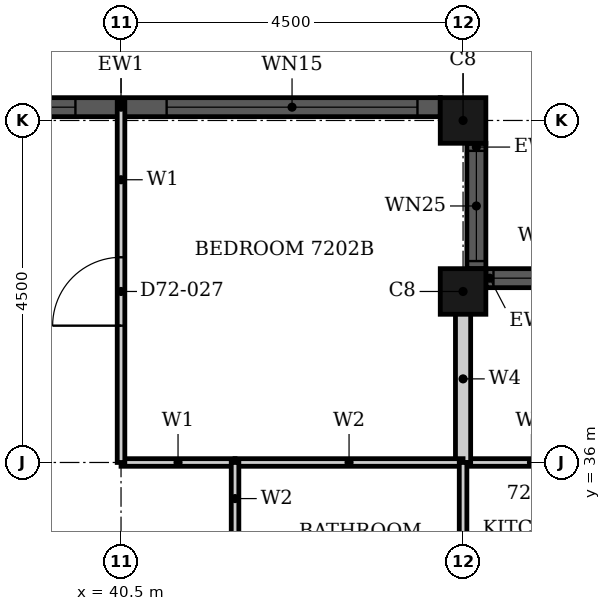
"""IFC4 building model, lengths in metres.
Left out: names, types, materials, properties, quantities, classifications, styles, units other than length and angle.
Written with IfcOpenShell. Run it as: python <this file> out.ifc"""

import sys

from ifc_helpers import new_model, si_unit, direction, frame, frame_2d, origin, origin_2d, place, context, subcontext, project, spatial, rectangle, hollow_rectangle, extrude, element, fill, save


model = new_model("IFC4")
c1 = context("Model", 3, precision=1e-05, world=origin(), true_north=direction((0.0, 1.0)))
c2 = subcontext(c1, "Body", "Model", "MODEL_VIEW")
j1 = project(units=[si_unit("LENGTHUNIT", "METRE"), si_unit("PLANEANGLEUNIT", "RADIAN")], contexts=[c1])
p1 = place(None, origin())
s1 = spatial("IfcSite", under=j1, at=p1, CompositionType="ELEMENT")
p2 = place(p1, origin())
s2 = spatial("IfcBuilding", under=s1, at=p2, CompositionType="ELEMENT")
p3 = place(p2, frame((0.0, 0.0, 283.4)))
s3 = spatial("IfcBuildingStorey", under=s2, at=p3, CompositionType="ELEMENT", Elevation=283.4)
for number, where, z_axis, x_axis in (
    (1, (45.0, 38.25, 0.0), (0.0, 0.0, 1.0), (1.0, 0.0, 0.0)),
    (2, (45.0, 40.5, 0.0), (0.0, 0.0, 1.0), (1.0, 0.0, 0.0)),
):
    element("IfcColumn", number, at=place(p3, frame(where, z_axis=z_axis, x_axis=x_axis)), inside=s3, PredefinedType="COLUMN", context=c2, shape_type="SweptSolid", body=[
        extrude(hollow_rectangle(XDim=0.6, YDim=0.6, WallThickness=0.02, at=origin_2d()), origin(), (0.0, 0.0, 1.0), 3.7),
    ])
p4 = place(p3, frame((46.95, 38.425, 0.0), z_axis=(0.0, 0.0, 1.0), x_axis=(-1.0, 0.0, 0.0)))
e3 = element("IfcWall", 3, at=p4, inside=s3, PredefinedType="SOLIDWALL", context=c2, shape_type="SweptSolid", body=[
    extrude(rectangle(XDim=1.65, YDim=0.25, at=frame_2d((0.825, 0.0))), origin(), (0.0, 0.0, 1.0), 3.7),
])
p5 = place(p4, frame((0.1, 0.0, 0.9)))
e4 = element("IfcOpeningElement", 4, at=p5, cuts=e3, PredefinedType="OPENING", context=c2, shape_type="SweptSolid", body=[
    extrude(rectangle(XDim=1.45, YDim=1.85, at=frame_2d((0.725, 0.925))), frame((0.0, 0.135, 0.0), z_axis=(0.0, -1.0, 0.0), x_axis=(1.0, 0.0, 0.0)), (0.0, 0.0, 1.0), 0.27),
])
p6 = place(p3, frame((45.175, 38.55, 0.0), z_axis=(0.0, 0.0, 1.0), x_axis=(0.0, 1.0, 0.0)))
e5 = element("IfcWall", 5, at=p6, inside=s3, PredefinedType="SOLIDWALL", context=c2, shape_type="SweptSolid", body=[
    extrude(rectangle(XDim=1.65, YDim=0.25, at=frame_2d((0.825, 0.0))), origin(), (0.0, 0.0, 1.0), 3.7),
])
p7 = place(p6, frame((0.1, 0.0, 0.9)))
e6 = element("IfcOpeningElement", 6, at=p7, cuts=e5, PredefinedType="OPENING", context=c2, shape_type="SweptSolid", body=[
    extrude(rectangle(XDim=1.45, YDim=1.85, at=frame_2d((0.725, 0.925))), frame((0.0, 0.135, 0.0), z_axis=(0.0, -1.0, 0.0), x_axis=(1.0, 0.0, 0.0)), (0.0, 0.0, 1.0), 0.27),
])
p8 = place(p3, frame((44.7, 40.675, 0.0), z_axis=(0.0, 0.0, 1.0), x_axis=(-1.0, 0.0, 0.0)))
e7 = element("IfcWall", 7, at=p8, inside=s3, PredefinedType="SOLIDWALL", context=c2, shape_type="SweptSolid", body=[
    extrude(rectangle(XDim=8.4, YDim=0.25, at=frame_2d((4.2, 0.0))), origin(), (0.0, 0.0, 1.0), 3.7),
])
p9 = place(p8, frame((0.3, 0.0, 0.45)))
e8 = element("IfcOpeningElement", 8, at=p9, cuts=e7, PredefinedType="OPENING", context=c2, shape_type="SweptSolid", body=[
    extrude(rectangle(XDim=3.3, YDim=2.3, at=frame_2d((1.65, 1.15))), frame((0.0, 0.135, 0.0), z_axis=(0.0, -1.0, 0.0), x_axis=(1.0, 0.0, 0.0)), (0.0, 0.0, 1.0), 0.27),
])
p10 = place(p8, frame((4.8, 0.0, 0.45)))
e9 = element("IfcOpeningElement", 9, at=p10, cuts=e7, PredefinedType="OPENING", context=c2, shape_type="SweptSolid", body=[
    extrude(rectangle(XDim=3.3, YDim=2.3, at=frame_2d((1.65, 1.15))), frame((0.0, 0.135, 0.0), z_axis=(0.0, -1.0, 0.0), x_axis=(1.0, 0.0, 0.0)), (0.0, 0.0, 1.0), 0.27),
])
p11 = place(p3, frame((40.5, 36.0, 0.0), z_axis=(0.0, 0.0, 1.0), x_axis=(1.0, 0.0, 0.0)))
e10 = element("IfcWall", 10, at=p11, inside=s3, PredefinedType="PARTITIONING", context=c2, shape_type="SweptSolid", body=[
    extrude(rectangle(XDim=1.5, YDim=0.1, at=frame_2d((0.75, 0.0))), origin(), (0.0, 0.0, 1.0), 3.4),
])
p12 = place(p3, frame((45.0, 36.0, 0.0), z_axis=(0.0, 0.0, 1.0), x_axis=(1.0, 0.0, 0.0)))
e11 = element("IfcWall", 11, at=p12, inside=s3, PredefinedType="PARTITIONING", context=c2, shape_type="SweptSolid", body=[
    extrude(rectangle(XDim=1.8, YDim=0.1, at=frame_2d((0.9, 0.0))), origin(), (0.0, 0.0, 1.0), 3.4),
])
p13 = place(p3, frame((40.5, 36.0, 0.0), z_axis=(0.0, 0.0, 1.0), x_axis=(0.0, 1.0, 0.0)))
e12 = element("IfcWall", 12, at=p13, inside=s3, PredefinedType="PARTITIONING", context=c2, shape_type="SweptSolid", body=[
    extrude(rectangle(XDim=4.74, YDim=0.1, at=frame_2d((2.37, 0.0))), origin(), (0.0, 0.0, 1.0), 3.4),
])
p14 = place(p13, frame((1.8, 0.0, 0.0)))
e13 = element("IfcOpeningElement", 13, at=p14, cuts=e12, PredefinedType="OPENING", context=c2, shape_type="SweptSolid", body=[
    extrude(rectangle(XDim=0.9, YDim=2.1, at=frame_2d((0.45, 1.05))), frame((0.0, 0.06, 0.0), z_axis=(0.0, -1.0, 0.0), x_axis=(1.0, 0.0, 0.0)), (0.0, 0.0, 1.0), 0.12),
])
p15 = place(p3, frame((45.0, 36.0, 0.0), z_axis=(0.0, 0.0, 1.0), x_axis=(0.0, 1.0, 0.0)))
e14 = element("IfcWall", 14, at=p15, inside=s3, PredefinedType="PARTITIONING", context=c2, shape_type="SweptSolid", body=[
    extrude(rectangle(XDim=2.2, YDim=0.2, at=frame_2d((1.1, 0.0))), origin(), (0.0, 0.0, 1.0), 3.4),
])
p16 = place(p3, frame((42.0, 36.0, 0.0), z_axis=(0.0, 0.0, 1.0), x_axis=(1.0, 0.0, 0.0)))
e15 = element("IfcWall", 15, at=p16, inside=s3, PredefinedType="PARTITIONING", context=c2, shape_type="SweptSolid", body=[
    extrude(rectangle(XDim=3.0, YDim=0.1, at=frame_2d((1.5, 0.0))), origin(), (0.0, 0.0, 1.0), 3.4),
])
p17 = place(p3, frame((42.0, 33.3, 0.0), z_axis=(0.0, 0.0, 1.0), x_axis=(0.0, 1.0, 0.0)))
e16 = element("IfcWall", 16, at=p17, inside=s3, PredefinedType="PARTITIONING", context=c2, shape_type="SweptSolid", body=[
    extrude(rectangle(XDim=2.7, YDim=0.1, at=frame_2d((1.35, 0.0))), origin(), (0.0, 0.0, 1.0), 3.4),
])
p18 = place(p17, frame((0.95, 0.0, 0.0)))
e17 = element("IfcOpeningElement", 17, at=p18, cuts=e16, PredefinedType="OPENING", context=c2, shape_type="SweptSolid", body=[
    extrude(rectangle(XDim=0.8, YDim=2.1, at=frame_2d((0.4, 1.05))), frame((0.0, 0.06, 0.0), z_axis=(0.0, -1.0, 0.0), x_axis=(1.0, 0.0, 0.0)), (0.0, 0.0, 1.0), 0.12),
])
p19 = place(p3, frame((45.0, 33.3, 0.0), z_axis=(0.0, 0.0, 1.0), x_axis=(0.0, 1.0, 0.0)))
e18 = element("IfcWall", 18, at=p19, inside=s3, PredefinedType="PARTITIONING", context=c2, shape_type="SweptSolid", body=[
    extrude(rectangle(XDim=2.7, YDim=0.1, at=frame_2d((1.35, 0.0))), origin(), (0.0, 0.0, 1.0), 3.4),
])
p20 = place(p5, origin())
e19 = element("IfcWindow", 19, at=p20, inside=s3, PartitioningType="SINGLE_PANEL", PredefinedType="WINDOW", context=c2, shape_type="SweptSolid", body=[
    extrude(rectangle(XDim=1.45, YDim=1.85, at=frame_2d((0.725, 0.925))), frame((0.0, 0.03, 0.0), z_axis=(0.0, -1.0, 0.0), x_axis=(1.0, 0.0, 0.0)), (0.0, 0.0, 1.0), 0.06),
])
fill(e4, e19)
p21 = place(p7, origin())
e20 = element("IfcWindow", 20, at=p21, inside=s3, PartitioningType="SINGLE_PANEL", PredefinedType="WINDOW", context=c2, shape_type="SweptSolid", body=[
    extrude(rectangle(XDim=1.45, YDim=1.85, at=frame_2d((0.725, 0.925))), frame((0.0, 0.03, 0.0), z_axis=(0.0, -1.0, 0.0), x_axis=(1.0, 0.0, 0.0)), (0.0, 0.0, 1.0), 0.06),
])
fill(e6, e20)
p22 = place(p9, origin())
e21 = element("IfcWindow", 21, at=p22, inside=s3, PartitioningType="SINGLE_PANEL", PredefinedType="WINDOW", context=c2, shape_type="SweptSolid", body=[
    extrude(rectangle(XDim=3.3, YDim=2.3, at=frame_2d((1.65, 1.15))), frame((0.0, 0.03, 0.0), z_axis=(0.0, -1.0, 0.0), x_axis=(1.0, 0.0, 0.0)), (0.0, 0.0, 1.0), 0.06),
])
fill(e8, e21)
p23 = place(p10, origin())
e22 = element("IfcWindow", 22, at=p23, inside=s3, PartitioningType="SINGLE_PANEL", PredefinedType="WINDOW", context=c2, shape_type="SweptSolid", body=[
    extrude(rectangle(XDim=3.3, YDim=2.3, at=frame_2d((1.65, 1.15))), frame((0.0, 0.03, 0.0), z_axis=(0.0, -1.0, 0.0), x_axis=(1.0, 0.0, 0.0)), (0.0, 0.0, 1.0), 0.06),
])
fill(e9, e22)
p24 = place(p14, origin())
e23 = element("IfcDoor", 23, at=p24, inside=s3, OperationType="SINGLE_SWING_RIGHT", PredefinedType="DOOR", context=c2, shape_type="SweptSolid", body=[
    extrude(rectangle(XDim=0.9, YDim=2.1, at=frame_2d((0.45, 1.05))), frame((0.0, 0.025, 0.0), z_axis=(0.0, -1.0, 0.0), x_axis=(1.0, 0.0, 0.0)), (0.0, 0.0, 1.0), 0.05),
])
fill(e13, e23)
save(model, sys.argv[1])
